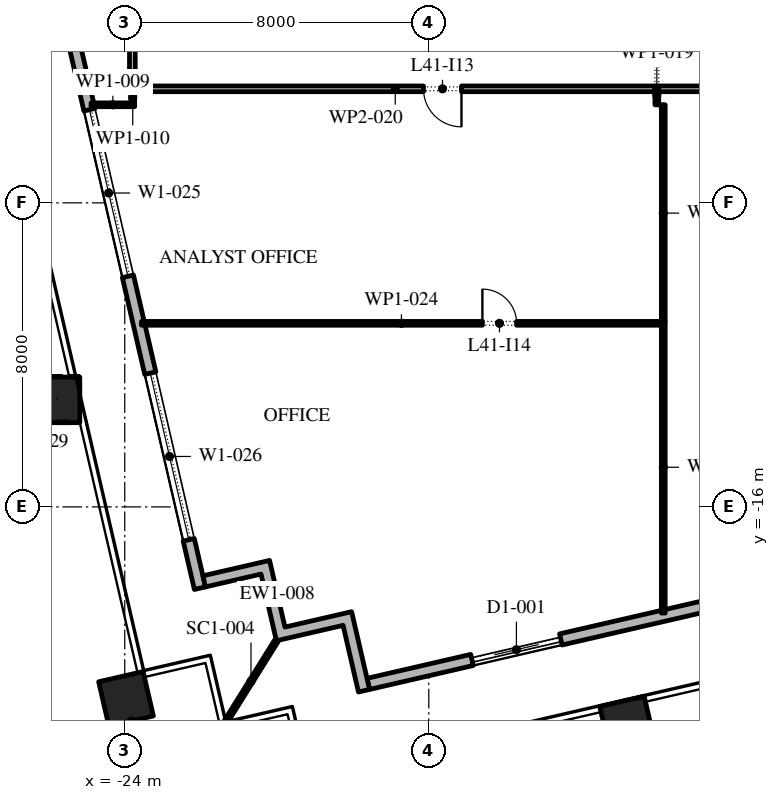
"""IFC4 building model, lengths in metres.
Left out: names, types, materials, properties, quantities, classifications, styles, units other than length and angle.
Written with IfcOpenShell. Run it as: python <this file> out.ifc"""

import sys

from ifc_helpers import new_model, si_unit, direction, frame, frame_2d, origin, origin_2d, place, context, subcontext, project, spatial, polyline, rectangle, outline, extrude, element, fill, save


model = new_model("IFC4")
c1 = context("Model", 3, precision=1e-05, world=origin(), true_north=direction((0.0, 1.0)))
c2 = subcontext(c1, "Body", "Model", "MODEL_VIEW")
j1 = project(units=[si_unit("LENGTHUNIT", "METRE"), si_unit("PLANEANGLEUNIT", "RADIAN")], contexts=[c1])
p1 = place(None, origin())
s1 = spatial("IfcSite", under=j1, at=p1, CompositionType="ELEMENT")
p2 = place(p1, origin())
s2 = spatial("IfcBuilding", under=s1, at=p2, CompositionType="ELEMENT")
p3 = place(p2, frame((0.0, 0.0, 188.4)))
s3 = spatial("IfcBuildingStorey", under=s2, at=p3, CompositionType="ELEMENT", Elevation=188.4)
p4 = place(p3, frame((-10.782, -21.702, 0.0), z_axis=(0.0, 0.0, 1.0), x_axis=(0.974370064785, 0.224951054344, 0.0)))
e1 = element("IfcColumn", 1, at=p4, inside=s3, PredefinedType="COLUMN", context=c2, shape_type="SweptSolid", body=[
    extrude(rectangle(XDim=1.2, YDim=1.2, at=origin_2d()), origin(), (0.0, 0.0, 1.0), 4.2),
])
p5 = place(p3, frame((-25.783, -13.185, 0.0), z_axis=(-0.002673604768, 0.011682490397, 0.999928183049), x_axis=(-0.974798272484, -0.223088161862, 0.0)))
e2 = element("IfcColumn", 2, at=p5, inside=s3, PredefinedType="COLUMN", context=c2, shape_type="SweptSolid", body=[
    extrude(rectangle(XDim=1.2, YDim=1.2, at=origin_2d()), origin(), (0.0, 0.0, 1.0), 4.2),
])
p6 = place(p3, frame((-23.967, -21.051, 0.0), z_axis=(0.0, 0.0, 1.0), x_axis=(0.974370064785, 0.224951054344, 0.0)))
e3 = element("IfcColumn", 3, at=p6, inside=s3, PredefinedType="COLUMN", context=c2, shape_type="SweptSolid", body=[
    extrude(rectangle(XDim=1.2, YDim=1.2, at=origin_2d()), origin(), (0.0, 0.0, 1.0), 4.2),
])
p7 = place(p3, frame((-17.592, -20.657, 0.0), z_axis=(0.0, 0.0, 1.0), x_axis=(0.974370243697, 0.224950279389, 0.0)))
e4 = element("IfcWall", 4, at=p7, inside=s3, PredefinedType="STANDARD", context=c2, shape_type="SweptSolid", body=[
    extrude(rectangle(XDim=49.5, YDim=0.3, at=frame_2d((24.75, 0.0))), origin(), (0.0, 0.0, 1.0), 4.0),
])
p8 = place(p7, frame((2.8, 0.0, 0.0)))
e5 = element("IfcOpeningElement", 5, at=p8, cuts=e4, PredefinedType="OPENING", context=c2, shape_type="SweptSolid", body=[
    extrude(rectangle(XDim=2.4, YDim=3.5, at=frame_2d((1.2, 1.75))), frame((0.0, 0.16, 0.0), z_axis=(0.0, -1.0, 0.0), x_axis=(1.0, 0.0, 0.0)), (0.0, 0.0, 1.0), 0.32),
])
p9 = place(p7, frame((9.9, 0.0, 0.45)))
e6 = element("IfcOpeningElement", 6, at=p9, cuts=e4, PredefinedType="OPENING", context=c2, shape_type="SweptSolid", body=[
    extrude(rectangle(XDim=4.5, YDim=2.575, at=frame_2d((2.25, 1.288))), frame((0.0, 0.16, 0.0), z_axis=(0.0, -1.0, 0.0), x_axis=(1.0, 0.0, 0.0)), (0.0, 0.0, 1.0), 0.32),
])
p10 = place(p7, frame((18.2, 0.0, 0.45)))
e7 = element("IfcOpeningElement", 7, at=p10, cuts=e4, PredefinedType="OPENING", context=c2, shape_type="SweptSolid", body=[
    extrude(rectangle(XDim=4.5, YDim=3.05, at=frame_2d((2.25, 1.525))), frame((0.0, 0.16, 0.0), z_axis=(0.0, -1.0, 0.0), x_axis=(1.0, 0.0, 0.0)), (0.0, 0.0, 1.0), 0.32),
])
p11 = place(p7, frame((26.5, 0.0, 0.45)))
e8 = element("IfcOpeningElement", 8, at=p11, cuts=e4, PredefinedType="OPENING", context=c2, shape_type="SweptSolid", body=[
    extrude(rectangle(XDim=4.5, YDim=2.75, at=frame_2d((2.25, 1.375))), frame((0.0, 0.16, 0.0), z_axis=(0.0, -1.0, 0.0), x_axis=(1.0, 0.0, 0.0)), (0.0, 0.0, 1.0), 0.32),
])
p12 = place(p7, frame((35.85, 0.0, 0.0)))
e9 = element("IfcOpeningElement", 9, at=p12, cuts=e4, PredefinedType="OPENING", context=c2, shape_type="SweptSolid", body=[
    extrude(rectangle(XDim=2.4, YDim=3.5, at=frame_2d((1.2, 1.75))), frame((0.0, 0.16, 0.0), z_axis=(0.0, -1.0, 0.0), x_axis=(1.0, 0.0, 0.0)), (0.0, 0.0, 1.0), 0.32),
])
p13 = place(p7, frame((43.1, 0.0, 0.45)))
e10 = element("IfcOpeningElement", 10, at=p13, cuts=e4, PredefinedType="OPENING", context=c2, shape_type="SweptSolid", body=[
    extrude(rectangle(XDim=4.5, YDim=2.875, at=frame_2d((2.25, 1.438))), frame((0.0, 0.16, 0.0), z_axis=(0.0, -1.0, 0.0), x_axis=(1.0, 0.0, 0.0)), (0.0, 0.0, 1.0), 0.32),
])
p14 = place(p3, frame((-33.157, 30.092, 0.0), z_axis=(0.0, 0.0, 1.0), x_axis=(0.224950279389, -0.974370243697, 0.0)))
e11 = element("IfcWall", 11, at=p14, inside=s3, PredefinedType="STANDARD", context=c2, shape_type="SweptSolid", body=[
    extrude(rectangle(XDim=49.5, YDim=0.3, at=frame_2d((24.75, 0.0))), origin(), (0.0, 0.0, 1.0), 4.0),
])
p15 = place(p14, frame((2.207, 0.0, 0.0)))
e12 = element("IfcOpeningElement", 12, at=p15, cuts=e11, PredefinedType="OPENING", context=c2, shape_type="SweptSolid", body=[
    extrude(rectangle(XDim=2.4, YDim=3.5, at=frame_2d((1.2, 1.75))), frame((0.0, 0.16, 0.0), z_axis=(0.0, -1.0, 0.0), x_axis=(1.0, 0.0, 0.0)), (0.0, 0.0, 1.0), 0.32),
])
p16 = place(p14, frame((8.121, 0.0, 0.45)))
e13 = element("IfcOpeningElement", 13, at=p16, cuts=e11, PredefinedType="OPENING", context=c2, shape_type="SweptSolid", body=[
    extrude(rectangle(XDim=4.5, YDim=2.825, at=frame_2d((2.25, 1.413))), frame((0.0, 0.16, 0.0), z_axis=(0.0, -1.0, 0.0), x_axis=(1.0, 0.0, 0.0)), (0.0, 0.0, 1.0), 0.32),
])
p17 = place(p14, frame((15.236, 0.0, 0.45)))
e14 = element("IfcOpeningElement", 14, at=p17, cuts=e11, PredefinedType="OPENING", context=c2, shape_type="SweptSolid", body=[
    extrude(rectangle(XDim=4.5, YDim=2.95, at=frame_2d((2.25, 1.475))), frame((0.0, 0.16, 0.0), z_axis=(0.0, -1.0, 0.0), x_axis=(1.0, 0.0, 0.0)), (0.0, 0.0, 1.0), 0.32),
])
p18 = place(p14, frame((22.35, 0.0, 0.45)))
e15 = element("IfcOpeningElement", 15, at=p18, cuts=e11, PredefinedType="OPENING", context=c2, shape_type="SweptSolid", body=[
    extrude(rectangle(XDim=4.5, YDim=3.0, at=frame_2d((2.25, 1.5))), frame((0.0, 0.16, 0.0), z_axis=(0.0, -1.0, 0.0), x_axis=(1.0, 0.0, 0.0)), (0.0, 0.0, 1.0), 0.32),
])
p19 = place(p14, frame((30.514, 0.0, 0.0)))
e16 = element("IfcOpeningElement", 16, at=p19, cuts=e11, PredefinedType="OPENING", context=c2, shape_type="SweptSolid", body=[
    extrude(rectangle(XDim=2.4, YDim=3.5, at=frame_2d((1.2, 1.75))), frame((0.0, 0.16, 0.0), z_axis=(0.0, -1.0, 0.0), x_axis=(1.0, 0.0, 0.0)), (0.0, 0.0, 1.0), 0.32),
])
p20 = place(p14, frame((36.579, 0.0, 0.45)))
e17 = element("IfcOpeningElement", 17, at=p20, cuts=e11, PredefinedType="OPENING", context=c2, shape_type="SweptSolid", body=[
    extrude(rectangle(XDim=4.5, YDim=3.05, at=frame_2d((2.25, 1.525))), frame((0.0, 0.16, 0.0), z_axis=(0.0, -1.0, 0.0), x_axis=(1.0, 0.0, 0.0)), (0.0, 0.0, 1.0), 0.32),
])
p21 = place(p14, frame((43.693, 0.0, 0.45)))
e18 = element("IfcOpeningElement", 18, at=p21, cuts=e11, PredefinedType="OPENING", context=c2, shape_type="SweptSolid", body=[
    extrude(rectangle(XDim=4.5, YDim=3.05, at=frame_2d((2.25, 1.525))), frame((0.0, 0.16, 0.0), z_axis=(0.0, -1.0, 0.0), x_axis=(1.0, 0.0, 0.0)), (0.0, 0.0, 1.0), 0.32),
])
p22 = place(p3, origin())
e19 = element("IfcWall", 19, at=p22, inside=s3, PredefinedType="STANDARD", context=c2, shape_type="SweptSolid", body=[
    extrude(outline(polyline([(-18.256, -19.117), (-20.01, -19.522), (-20.414, -17.768), (-21.876, -18.105), (-21.943, -17.813), (-20.19, -17.408), (-19.785, -19.162), (-18.031, -18.757), (-17.558, -20.803), (-17.851, -20.871), (-18.256, -19.117)])), origin(), (0.0, 0.0, 1.0), 4.0),
])
p23 = place(p3, frame((-20.01, -19.522, -0.05), z_axis=(0.0, 0.0, 1.0), x_axis=(-0.529920736377, -0.848047176257, 0.0)))
e20 = element("IfcWall", 20, at=p23, inside=s3, PredefinedType="STANDARD", context=c2, shape_type="SweptSolid", body=[
    extrude(rectangle(XDim=2.526, YDim=0.1, at=frame_2d((1.263, 0.0))), origin(), (0.0, 0.0, 1.0), 4.05),
])
p24 = place(p3, frame((-23.8, -5.075, 0.0), z_axis=(0.0, 0.0, 1.0), x_axis=(0.0, 1.0, 0.0)))
e21 = element("IfcWall", 21, at=p24, inside=s3, PredefinedType="PARTITIONING", context=c2, shape_type="SweptSolid", body=[
    extrude(rectangle(XDim=14.745, YDim=0.15, at=frame_2d((7.373, 0.0))), origin(), (0.0, 0.0, 1.0), 4.0),
])
p25 = place(p24, frame((5.545, 0.0, 0.0)))
e22 = element("IfcOpeningElement", 22, at=p25, cuts=e21, PredefinedType="OPENING", context=c2, shape_type="SweptSolid", body=[
    extrude(rectangle(XDim=1.0, YDim=2.1, at=frame_2d((0.5, 1.05))), frame((0.0, 0.085, 0.0), z_axis=(0.0, -1.0, 0.0), x_axis=(1.0, 0.0, 0.0)), (0.0, 0.0, 1.0), 0.17),
])
p26 = place(p3, frame((-23.74, -5.42, 0.0), z_axis=(0.0, 0.0, 1.0), x_axis=(-1.0, 0.0, 0.0)))
e23 = element("IfcWall", 23, at=p26, inside=s3, PredefinedType="PARTITIONING", context=c2, shape_type="SweptSolid", body=[
    extrude(rectangle(XDim=1.147, YDim=0.1, at=frame_2d((0.573, 0.0))), origin(), (0.0, 0.0, 1.0), 4.0),
])
p27 = place(p3, frame((-23.79, -5.075, 0.0), z_axis=(0.0, 0.0, 1.0), x_axis=(0.0, -1.0, 0.0)))
e24 = element("IfcWall", 24, at=p27, inside=s3, PredefinedType="PARTITIONING", context=c2, shape_type="SweptSolid", body=[
    extrude(rectangle(XDim=0.295, YDim=0.1, at=frame_2d((0.147, 0.0))), origin(), (0.0, 0.0, 1.0), 4.0),
])
p28 = place(p3, frame((-10.0, -5.42, 0.0), z_axis=(0.0, 0.0, 1.0), x_axis=(0.0, 1.0, 0.0)))
e25 = element("IfcWall", 25, at=p28, inside=s3, PredefinedType="PARTITIONING", context=c2, shape_type="SweptSolid", body=[
    extrude(rectangle(XDim=0.495, YDim=0.1, at=frame_2d((0.248, 0.0))), origin(), (0.0, 0.0, 1.0), 4.0),
])
p29 = place(p3, frame((-10.05, -5.0, 0.0), z_axis=(0.0, 0.0, 1.0), x_axis=(-1.0, 0.0, 0.0)))
e26 = element("IfcWall", 26, at=p29, inside=s3, PredefinedType="PARTITIONING", context=c2, shape_type="SweptSolid", body=[
    extrude(rectangle(XDim=13.665, YDim=0.15, at=frame_2d((6.833, 0.0))), origin(), (0.0, 0.0, 1.0), 4.0),
])
p30 = place(p29, frame((5.09, 0.0, 0.0)))
e27 = element("IfcOpeningElement", 27, at=p30, cuts=e26, PredefinedType="OPENING", context=c2, shape_type="SweptSolid", body=[
    extrude(rectangle(XDim=1.0, YDim=2.1, at=frame_2d((0.5, 1.05))), frame((0.0, 0.085, 0.0), z_axis=(0.0, -1.0, 0.0), x_axis=(1.0, 0.0, 0.0)), (0.0, 0.0, 1.0), 0.17),
])
p31 = place(p3, frame((-9.83, -18.794, 0.0), z_axis=(0.0, 0.0, 1.0), x_axis=(0.0, 1.0, 0.0)))
e28 = element("IfcWall", 28, at=p31, inside=s3, PredefinedType="PARTITIONING", context=c2, shape_type="SweptSolid", body=[
    extrude(rectangle(XDim=7.674, YDim=0.1, at=frame_2d((3.837, 0.0))), origin(), (0.0, 0.0, 1.0), 4.0),
])
p32 = place(p3, frame((-9.88, -11.17, 0.0), z_axis=(0.0, 0.0, 1.0), x_axis=(-1.0, 0.0, 0.0)))
e29 = element("IfcWall", 29, at=p32, inside=s3, PredefinedType="PARTITIONING", context=c2, shape_type="SweptSolid", body=[
    extrude(rectangle(XDim=13.68, YDim=0.1, at=frame_2d((6.84, 0.0))), origin(), (0.0, 0.0, 1.0), 4.0),
])
p33 = place(p32, frame((3.81, 0.0, 0.0)))
e30 = element("IfcOpeningElement", 30, at=p33, cuts=e29, PredefinedType="OPENING", context=c2, shape_type="SweptSolid", body=[
    extrude(rectangle(XDim=0.9, YDim=2.1, at=frame_2d((0.45, 1.05))), frame((0.0, 0.06, 0.0), z_axis=(0.0, -1.0, 0.0), x_axis=(1.0, 0.0, 0.0)), (0.0, 0.0, 1.0), 0.12),
])
p34 = place(p3, frame((-9.83, -11.12, 0.0), z_axis=(0.0, 0.0, 1.0), x_axis=(0.0, 1.0, 0.0)))
e31 = element("IfcWall", 31, at=p34, inside=s3, PredefinedType="PARTITIONING", context=c2, shape_type="SweptSolid", body=[
    extrude(rectangle(XDim=5.7, YDim=0.1, at=frame_2d((2.85, 0.0))), origin(), (0.0, 0.0, 1.0), 4.0),
])
p35 = place(p3, frame((-1.065, -5.0, 0.0), z_axis=(0.0, 0.0, 1.0), x_axis=(-1.0, 0.0, 0.0)))
e32 = element("IfcWall", 32, at=p35, inside=s3, PredefinedType="PARTITIONING", context=c2, shape_type="SweptSolid", body=[
    extrude(rectangle(XDim=8.885, YDim=0.15, at=frame_2d((4.442, 0.0))), origin(), (0.0, 0.0, 1.0), 4.0),
])
p36 = place(p8, origin())
e33 = element("IfcDoor", 33, at=p36, inside=s3, OperationType="DOUBLE_DOOR_SLIDING", PredefinedType="DOOR", context=c2, shape_type="SweptSolid", body=[
    extrude(rectangle(XDim=2.4, YDim=3.5, at=frame_2d((1.2, 1.75))), frame((0.0, 0.025, 0.0), z_axis=(0.0, -1.0, 0.0), x_axis=(1.0, 0.0, 0.0)), (0.0, 0.0, 1.0), 0.05),
])
fill(e5, e33)
p37 = place(p20, origin())
e34 = element("IfcWindow", 34, at=p37, inside=s3, PartitioningType="DOUBLE_PANEL_VERTICAL", PredefinedType="WINDOW", context=c2, shape_type="SweptSolid", body=[
    extrude(rectangle(XDim=4.5, YDim=3.05, at=frame_2d((2.25, 1.525))), frame((0.0, 0.03, 0.0), z_axis=(0.0, -1.0, 0.0), x_axis=(1.0, 0.0, 0.0)), (0.0, 0.0, 1.0), 0.06),
])
fill(e17, e34)
p38 = place(p21, origin())
e35 = element("IfcWindow", 35, at=p38, inside=s3, PartitioningType="DOUBLE_PANEL_VERTICAL", PredefinedType="WINDOW", context=c2, shape_type="SweptSolid", body=[
    extrude(rectangle(XDim=4.5, YDim=3.05, at=frame_2d((2.25, 1.525))), frame((0.0, 0.03, 0.0), z_axis=(0.0, -1.0, 0.0), x_axis=(1.0, 0.0, 0.0)), (0.0, 0.0, 1.0), 0.06),
])
fill(e18, e35)
p39 = place(p30, origin())
e36 = element("IfcDoor", 36, at=p39, inside=s3, OperationType="SINGLE_SWING_RIGHT", PredefinedType="DOOR", context=c2, shape_type="SweptSolid", body=[
    extrude(rectangle(XDim=1.0, YDim=2.1, at=frame_2d((0.5, 1.05))), frame((0.0, 0.025, 0.0), z_axis=(0.0, -1.0, 0.0), x_axis=(1.0, 0.0, 0.0)), (0.0, 0.0, 1.0), 0.05),
])
fill(e27, e36)
p40 = place(p33, frame((0.9, 0.0, 0.0), z_axis=(0.0, 0.0, 1.0), x_axis=(-1.0, 0.0, 0.0)))
e37 = element("IfcDoor", 37, at=p40, inside=s3, OperationType="SINGLE_SWING_RIGHT", PredefinedType="DOOR", context=c2, shape_type="SweptSolid", body=[
    extrude(rectangle(XDim=0.9, YDim=2.1, at=frame_2d((0.45, 1.05))), frame((0.0, 0.025, 0.0), z_axis=(0.0, -1.0, 0.0), x_axis=(1.0, 0.0, 0.0)), (0.0, 0.0, 1.0), 0.05),
])
fill(e30, e37)
save(model, sys.argv[1])
